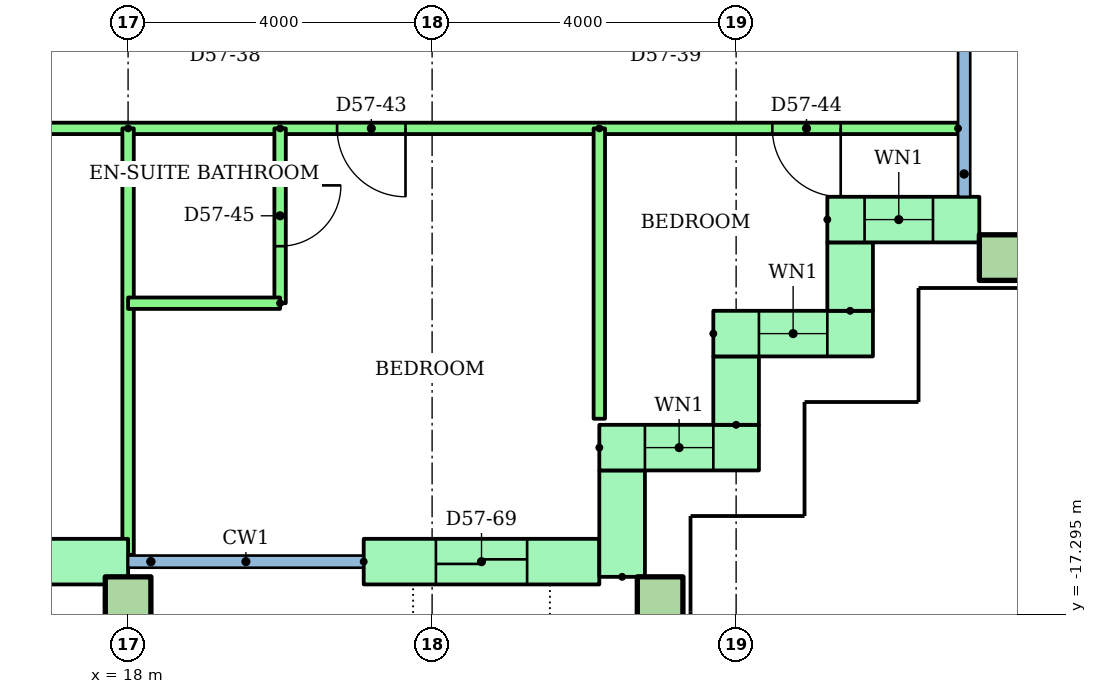
"""IFC4 building model, lengths in metres.
Left out: names, types, materials, properties, quantities, classifications, styles, units other than length and angle.
Written with IfcOpenShell. Run it as: python <this file> out.ifc"""

import sys

from ifc_helpers import new_model, si_unit, direction, frame, frame_2d, origin, origin_2d, place, context, subcontext, project, spatial, rectangle, hollow_rectangle, extrude, element, fill, save


model = new_model("IFC4")
c1 = context("Model", 3, precision=1e-05, world=origin(), true_north=direction((0.0, 1.0)))
c2 = subcontext(c1, "Body", "Model", "MODEL_VIEW")
j1 = project(units=[si_unit("LENGTHUNIT", "METRE"), si_unit("PLANEANGLEUNIT", "RADIAN")], contexts=[c1])
p1 = place(None, origin())
s1 = spatial("IfcSite", under=j1, at=p1, CompositionType="ELEMENT")
p2 = place(p1, origin())
s2 = spatial("IfcBuilding", under=s1, at=p2, CompositionType="ELEMENT")
p3 = place(p2, frame((0.0, 0.0, 220.4)))
s3 = spatial("IfcBuildingStorey", under=s2, at=p3, CompositionType="ELEMENT", Elevation=220.4)
for number, where in (
    (1, (18.0, -17.1, 0.0)),
    (2, (25.0, -17.1, 0.0)),
    (3, (29.5, -12.6, 0.0)),
):
    element("IfcColumn", number, at=place(p3, frame(where)), inside=s3, PredefinedType="COLUMN", context=c2, shape_type="SweptSolid", body=[
        extrude(hollow_rectangle(XDim=0.6, YDim=0.6, WallThickness=0.03, at=origin_2d()), origin(), (0.0, 0.0, 1.0), 3.2),
    ])
p4 = place(p3, frame((14.0, -16.6, 0.0)))
e4 = element("IfcWall", 4, at=p4, inside=s3, PredefinedType="STANDARD", context=c2, shape_type="SweptSolid", body=[
    extrude(rectangle(XDim=4.0, YDim=0.6, at=frame_2d((2.0, 0.0))), origin(), (0.0, 0.0, 1.0), 2.92),
])
p5 = place(p4, frame((1.4, 0.0, 0.0)))
e5 = element("IfcOpeningElement", 5, at=p5, cuts=e4, PredefinedType="OPENING", context=c2, shape_type="SweptSolid", body=[
    extrude(rectangle(XDim=1.2, YDim=2.1, at=frame_2d((0.6, 1.05))), frame((0.0, 0.31, 0.0), z_axis=(0.0, -1.0, 0.0), x_axis=(1.0, 0.0, 0.0)), (0.0, 0.0, 1.0), 0.62),
])
p6 = place(p3, frame((21.1, -16.6, 0.0)))
e6 = element("IfcWall", 6, at=p6, inside=s3, PredefinedType="STANDARD", context=c2, shape_type="SweptSolid", body=[
    extrude(rectangle(XDim=3.1, YDim=0.6, at=frame_2d((1.55, 0.0))), origin(), (0.0, 0.0, 1.0), 2.92),
])
p7 = place(p6, frame((0.95, 0.0, 0.0)))
e7 = element("IfcOpeningElement", 7, at=p7, cuts=e6, PredefinedType="OPENING", context=c2, shape_type="SweptSolid", body=[
    extrude(rectangle(XDim=1.2, YDim=2.1, at=frame_2d((0.6, 1.05))), frame((0.0, 0.31, 0.0), z_axis=(0.0, -1.0, 0.0), x_axis=(1.0, 0.0, 0.0)), (0.0, 0.0, 1.0), 0.62),
])
p8 = place(p3, frame((24.5, -16.8, 0.0), z_axis=(0.0, 0.0, 1.0), x_axis=(0.0, 1.0, 0.0)))
e8 = element("IfcWall", 8, at=p8, inside=s3, PredefinedType="STANDARD", context=c2, shape_type="SweptSolid", body=[
    extrude(rectangle(XDim=1.4, YDim=0.6, at=frame_2d((0.7, 0.0))), origin(), (0.0, 0.0, 1.0), 2.92),
])
p9 = place(p3, frame((24.2, -15.1, 0.0)))
e9 = element("IfcWall", 9, at=p9, inside=s3, PredefinedType="STANDARD", context=c2, shape_type="SweptSolid", body=[
    extrude(rectangle(XDim=2.1, YDim=0.6, at=frame_2d((1.05, 0.0))), origin(), (0.0, 0.0, 1.0), 2.92),
])
p10 = place(p9, frame((0.6, 0.0, 0.9)))
e10 = element("IfcOpeningElement", 10, at=p10, cuts=e9, PredefinedType="OPENING", context=c2, shape_type="SweptSolid", body=[
    extrude(rectangle(XDim=0.9, YDim=1.5, at=frame_2d((0.45, 0.75))), frame((0.0, 0.31, 0.0), z_axis=(0.0, -1.0, 0.0), x_axis=(1.0, 0.0, 0.0)), (0.0, 0.0, 1.0), 0.62),
])
p11 = place(p3, frame((26.0, -14.8, 0.0), z_axis=(0.0, 0.0, 1.0), x_axis=(0.0, 1.0, 0.0)))
e11 = element("IfcWall", 11, at=p11, inside=s3, PredefinedType="STANDARD", context=c2, shape_type="SweptSolid", body=[
    extrude(rectangle(XDim=0.9, YDim=0.6, at=frame_2d((0.45, 0.0))), origin(), (0.0, 0.0, 1.0), 2.92),
])
p12 = place(p3, frame((25.7, -13.6, 0.0)))
e12 = element("IfcWall", 12, at=p12, inside=s3, PredefinedType="STANDARD", context=c2, shape_type="SweptSolid", body=[
    extrude(rectangle(XDim=2.1, YDim=0.6, at=frame_2d((1.05, 0.0))), origin(), (0.0, 0.0, 1.0), 2.92),
])
p13 = place(p12, frame((0.6, 0.0, 0.9)))
e13 = element("IfcOpeningElement", 13, at=p13, cuts=e12, PredefinedType="OPENING", context=c2, shape_type="SweptSolid", body=[
    extrude(rectangle(XDim=0.9, YDim=1.5, at=frame_2d((0.45, 0.75))), frame((0.0, 0.31, 0.0), z_axis=(0.0, -1.0, 0.0), x_axis=(1.0, 0.0, 0.0)), (0.0, 0.0, 1.0), 0.62),
])
p14 = place(p3, frame((27.5, -13.3, 0.0), z_axis=(0.0, 0.0, 1.0), x_axis=(0.0, 1.0, 0.0)))
e14 = element("IfcWall", 14, at=p14, inside=s3, PredefinedType="STANDARD", context=c2, shape_type="SweptSolid", body=[
    extrude(rectangle(XDim=0.9, YDim=0.6, at=frame_2d((0.45, 0.0))), origin(), (0.0, 0.0, 1.0), 2.92),
])
p15 = place(p3, frame((27.2, -12.1, 0.0)))
e15 = element("IfcWall", 15, at=p15, inside=s3, PredefinedType="STANDARD", context=c2, shape_type="SweptSolid", body=[
    extrude(rectangle(XDim=2.0, YDim=0.6, at=frame_2d((1.0, 0.0))), origin(), (0.0, 0.0, 1.0), 2.92),
])
p16 = place(p15, frame((0.49, 0.0, 0.9)))
e16 = element("IfcOpeningElement", 16, at=p16, cuts=e15, PredefinedType="OPENING", context=c2, shape_type="SweptSolid", body=[
    extrude(rectangle(XDim=0.9, YDim=1.5, at=frame_2d((0.45, 0.75))), frame((0.0, 0.31, 0.0), z_axis=(0.0, -1.0, 0.0), x_axis=(1.0, 0.0, 0.0)), (0.0, 0.0, 1.0), 0.62),
])
p17 = place(p3, frame((28.92, -10.9, 0.0), z_axis=(0.0, 0.0, 1.0), x_axis=(-1.0, 0.0, 0.0)))
e17 = element("IfcWall", 17, at=p17, inside=s3, PredefinedType="PARTITIONING", context=c2, shape_type="SweptSolid", body=[
    extrude(rectangle(XDim=26.92, YDim=0.15, at=frame_2d((13.46, 0.0))), origin(), (0.0, 0.0, 1.0), 2.4),
])
p18 = place(p17, frame((22.42, 0.0, 0.0)))
e18 = element("IfcOpeningElement", 18, at=p18, cuts=e17, PredefinedType="OPENING", context=c2, shape_type="SweptSolid", body=[
    extrude(rectangle(XDim=1.0, YDim=2.1, at=frame_2d((0.5, 1.05))), frame((0.0, 0.085, 0.0), z_axis=(0.0, -1.0, 0.0), x_axis=(1.0, 0.0, 0.0)), (0.0, 0.0, 1.0), 0.17),
])
p19 = place(p17, frame((16.47, 0.0, 0.0)))
e19 = element("IfcOpeningElement", 19, at=p19, cuts=e17, PredefinedType="OPENING", context=c2, shape_type="SweptSolid", body=[
    extrude(rectangle(XDim=0.9, YDim=2.1, at=frame_2d((0.45, 1.05))), frame((0.0, 0.085, 0.0), z_axis=(0.0, -1.0, 0.0), x_axis=(1.0, 0.0, 0.0)), (0.0, 0.0, 1.0), 0.17),
])
p20 = place(p17, frame((12.47, 0.0, 0.0)))
e20 = element("IfcOpeningElement", 20, at=p20, cuts=e17, PredefinedType="OPENING", context=c2, shape_type="SweptSolid", body=[
    extrude(rectangle(XDim=0.9, YDim=2.1, at=frame_2d((0.45, 1.05))), frame((0.0, 0.085, 0.0), z_axis=(0.0, -1.0, 0.0), x_axis=(1.0, 0.0, 0.0)), (0.0, 0.0, 1.0), 0.17),
])
p21 = place(p17, frame((7.27, 0.0, 0.0)))
e21 = element("IfcOpeningElement", 21, at=p21, cuts=e17, PredefinedType="OPENING", context=c2, shape_type="SweptSolid", body=[
    extrude(rectangle(XDim=0.9, YDim=2.1, at=frame_2d((0.45, 1.05))), frame((0.0, 0.085, 0.0), z_axis=(0.0, -1.0, 0.0), x_axis=(1.0, 0.0, 0.0)), (0.0, 0.0, 1.0), 0.17),
])
p22 = place(p17, frame((1.544, 0.0, 0.0)))
e22 = element("IfcOpeningElement", 22, at=p22, cuts=e17, PredefinedType="OPENING", context=c2, shape_type="SweptSolid", body=[
    extrude(rectangle(XDim=0.9, YDim=2.1, at=frame_2d((0.45, 1.05))), frame((0.0, 0.085, 0.0), z_axis=(0.0, -1.0, 0.0), x_axis=(1.0, 0.0, 0.0)), (0.0, 0.0, 1.0), 0.17),
])
p23 = place(p3, frame((18.0, -10.9, 0.0), z_axis=(0.0, 0.0, 1.0), x_axis=(0.0, -1.0, 0.0)))
e23 = element("IfcWall", 23, at=p23, inside=s3, PredefinedType="PARTITIONING", context=c2, shape_type="SweptSolid", body=[
    extrude(rectangle(XDim=5.61, YDim=0.15, at=frame_2d((2.805, 0.0))), origin(), (0.0, 0.0, 1.0), 2.4),
])
p24 = place(p3, frame((24.2, -10.9, 0.0), z_axis=(0.0, 0.0, 1.0), x_axis=(0.0, -1.0, 0.0)))
e24 = element("IfcWall", 24, at=p24, inside=s3, PredefinedType="PARTITIONING", context=c2, shape_type="SweptSolid", body=[
    extrude(rectangle(XDim=3.82, YDim=0.15, at=frame_2d((1.91, 0.0))), origin(), (0.0, 0.0, 1.0), 2.4),
])
p25 = place(p3, frame((20.0, -10.9, 0.0), z_axis=(0.0, 0.0, 1.0), x_axis=(0.0, -1.0, 0.0)))
e25 = element("IfcWall", 25, at=p25, inside=s3, PredefinedType="PARTITIONING", context=c2, shape_type="SweptSolid", body=[
    extrude(rectangle(XDim=2.3, YDim=0.15, at=frame_2d((1.15, 0.0))), origin(), (0.0, 0.0, 1.0), 2.4),
])
p26 = place(p25, frame((0.75, 0.0, 0.0)))
e26 = element("IfcOpeningElement", 26, at=p26, cuts=e25, PredefinedType="OPENING", context=c2, shape_type="SweptSolid", body=[
    extrude(rectangle(XDim=0.8, YDim=2.1, at=frame_2d((0.4, 1.05))), frame((0.0, 0.085, 0.0), z_axis=(0.0, -1.0, 0.0), x_axis=(1.0, 0.0, 0.0)), (0.0, 0.0, 1.0), 0.17),
])
p27 = place(p3, frame((20.0, -13.2, 0.0), z_axis=(0.0, 0.0, 1.0), x_axis=(-1.0, 0.0, 0.0)))
e27 = element("IfcWall", 27, at=p27, inside=s3, PredefinedType="PARTITIONING", context=c2, shape_type="SweptSolid", body=[
    extrude(rectangle(XDim=2.0, YDim=0.15, at=frame_2d((1.0, 0.0))), origin(), (0.0, 0.0, 1.0), 2.4),
])
p28 = place(p10, origin())
e28 = element("IfcWindow", 28, at=p28, inside=s3, PartitioningType="SINGLE_PANEL", PredefinedType="WINDOW", context=c2, shape_type="SweptSolid", body=[
    extrude(rectangle(XDim=0.9, YDim=1.5, at=frame_2d((0.45, 0.75))), frame((0.0, 0.03, 0.0), z_axis=(0.0, -1.0, 0.0), x_axis=(1.0, 0.0, 0.0)), (0.0, 0.0, 1.0), 0.06),
])
fill(e10, e28)
p29 = place(p13, origin())
e29 = element("IfcWindow", 29, at=p29, inside=s3, PartitioningType="SINGLE_PANEL", PredefinedType="WINDOW", context=c2, shape_type="SweptSolid", body=[
    extrude(rectangle(XDim=0.9, YDim=1.5, at=frame_2d((0.45, 0.75))), frame((0.0, 0.03, 0.0), z_axis=(0.0, -1.0, 0.0), x_axis=(1.0, 0.0, 0.0)), (0.0, 0.0, 1.0), 0.06),
])
fill(e13, e29)
p30 = place(p16, origin())
e30 = element("IfcWindow", 30, at=p30, inside=s3, PartitioningType="SINGLE_PANEL", PredefinedType="WINDOW", context=c2, shape_type="SweptSolid", body=[
    extrude(rectangle(XDim=0.9, YDim=1.5, at=frame_2d((0.45, 0.75))), frame((0.0, 0.03, 0.0), z_axis=(0.0, -1.0, 0.0), x_axis=(1.0, 0.0, 0.0)), (0.0, 0.0, 1.0), 0.06),
])
fill(e16, e30)
p31 = place(p21, origin())
e31 = element("IfcDoor", 31, at=p31, inside=s3, OperationType="SINGLE_SWING_LEFT", PredefinedType="DOOR", context=c2, shape_type="SweptSolid", body=[
    extrude(rectangle(XDim=0.9, YDim=2.1, at=frame_2d((0.45, 1.05))), frame((0.0, 0.025, 0.0), z_axis=(0.0, -1.0, 0.0), x_axis=(1.0, 0.0, 0.0)), (0.0, 0.0, 1.0), 0.05),
])
fill(e21, e31)
p32 = place(p22, origin())
e32 = element("IfcDoor", 32, at=p32, inside=s3, OperationType="SINGLE_SWING_LEFT", PredefinedType="DOOR", context=c2, shape_type="SweptSolid", body=[
    extrude(rectangle(XDim=0.9, YDim=2.1, at=frame_2d((0.45, 1.05))), frame((0.0, 0.025, 0.0), z_axis=(0.0, -1.0, 0.0), x_axis=(1.0, 0.0, 0.0)), (0.0, 0.0, 1.0), 0.05),
])
fill(e22, e32)
p33 = place(p26, origin())
e33 = element("IfcDoor", 33, at=p33, inside=s3, OperationType="SINGLE_SWING_LEFT", PredefinedType="DOOR", context=c2, shape_type="SweptSolid", body=[
    extrude(rectangle(XDim=0.8, YDim=2.1, at=frame_2d((0.4, 1.05))), frame((0.0, 0.025, 0.0), z_axis=(0.0, -1.0, 0.0), x_axis=(1.0, 0.0, 0.0)), (0.0, 0.0, 1.0), 0.05),
])
fill(e26, e33)
p34 = place(p7, origin())
e34 = element("IfcDoor", 34, at=p34, inside=s3, OperationType="SLIDING_TO_LEFT", PredefinedType="DOOR", context=c2, shape_type="SweptSolid", body=[
    extrude(rectangle(XDim=1.2, YDim=2.1, at=frame_2d((0.6, 1.05))), frame((0.0, 0.025, 0.0), z_axis=(0.0, -1.0, 0.0), x_axis=(1.0, 0.0, 0.0)), (0.0, 0.0, 1.0), 0.05),
])
fill(e7, e34)
save(model, sys.argv[1])
